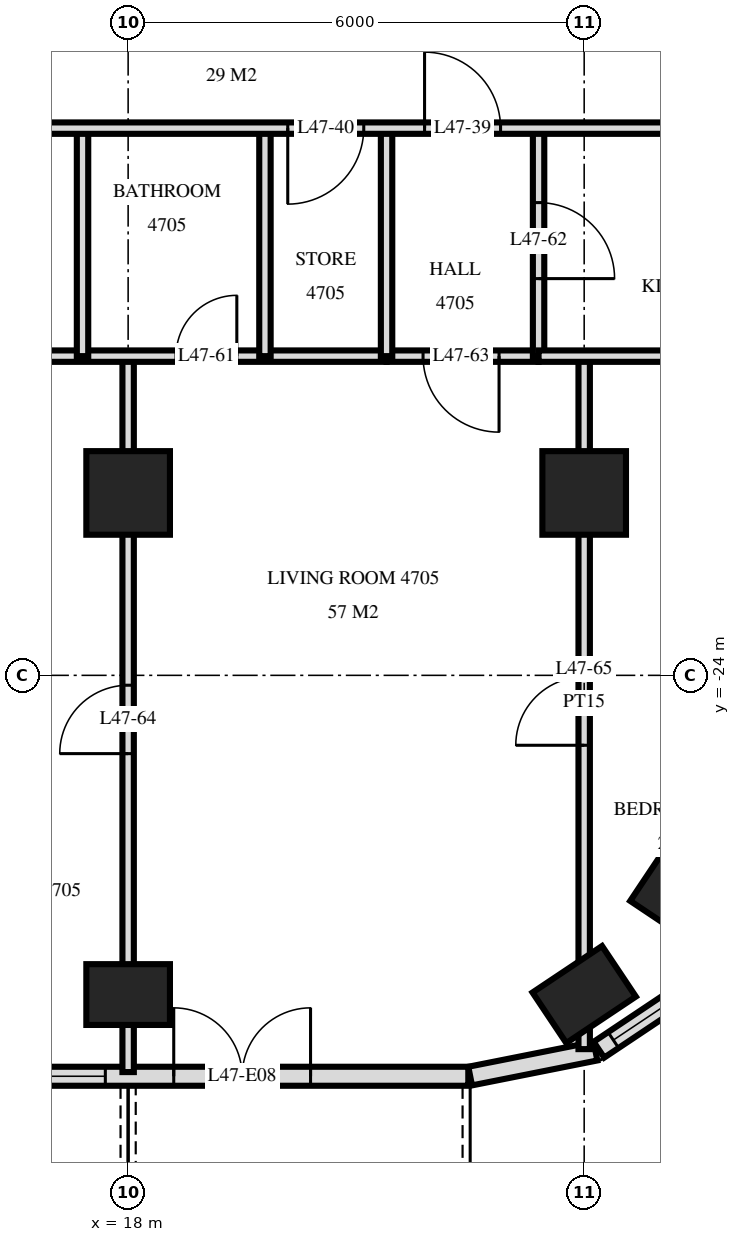
"""IFC4 building model, lengths in metres.
Left out: names, types, materials, properties, quantities, classifications, styles, units other than length and angle.
Written with IfcOpenShell. Run it as: python <this file> out.ifc"""

import sys

from ifc_helpers import new_model, si_unit, direction, frame, frame_2d, origin, origin_2d, place, context, subcontext, project, spatial, rectangle, extrude, element, fill, save


model = new_model("IFC4")
c1 = context("Model", 3, precision=1e-05, world=origin(), true_north=direction((0.0, 1.0)))
c2 = subcontext(c1, "Body", "Model", "MODEL_VIEW")
j1 = project(units=[si_unit("LENGTHUNIT", "METRE"), si_unit("PLANEANGLEUNIT", "RADIAN")], contexts=[c1])
p1 = place(None, origin())
s1 = spatial("IfcSite", under=j1, at=p1, CompositionType="ELEMENT")
p2 = place(p1, origin())
s2 = spatial("IfcBuilding", under=s1, at=p2, CompositionType="ELEMENT")
p3 = place(p2, frame((0.0, 0.0, 183.6)))
s3 = spatial("IfcBuildingStorey", under=s2, at=p3, CompositionType="ELEMENT", Elevation=183.6)
p4 = place(p3, frame((18.0, -28.2, -0.28), z_axis=(0.0, 0.0, 1.0), x_axis=(1.0, 0.0, 0.0)))
e1 = element("IfcColumn", 1, at=p4, inside=s3, PredefinedType="COLUMN", context=c2, shape_type="SweptSolid", body=[
    extrude(rectangle(XDim=1.1, YDim=0.8, at=origin_2d()), origin(), (0.0, 0.0, 1.0), 3.78),
])
p5 = place(p3, frame((18.0, -21.6, -0.28), z_axis=(0.0, 0.0, 1.0), x_axis=(1.0, 0.0, 0.0)))
e2 = element("IfcColumn", 2, at=p5, inside=s3, PredefinedType="COLUMN", context=c2, shape_type="SweptSolid", body=[
    extrude(rectangle(XDim=1.1, YDim=1.1, at=origin_2d()), origin(), (0.0, 0.0, 1.0), 3.78),
])
p6 = place(p3, frame((24.0, -28.2, -0.28), z_axis=(0.0, 0.0, 1.0), x_axis=(0.831459915646, 0.555584744817, 0.0)))
e3 = element("IfcColumn", 3, at=p6, inside=s3, PredefinedType="COLUMN", context=c2, shape_type="SweptSolid", body=[
    extrude(rectangle(XDim=1.1, YDim=0.8, at=origin_2d()), origin(), (0.0, 0.0, 1.0), 3.78),
])
p7 = place(p3, frame((24.0, -21.6, -0.28), z_axis=(0.0, 0.0, 1.0), x_axis=(1.0, 0.0, 0.0)))
e4 = element("IfcColumn", 4, at=p7, inside=s3, PredefinedType="COLUMN", context=c2, shape_type="SweptSolid", body=[
    extrude(rectangle(XDim=1.1, YDim=1.1, at=origin_2d()), origin(), (0.0, 0.0, 1.0), 3.78),
])
p8 = place(p3, frame((25.244, -26.733, -0.28), z_axis=(0.0, 0.0, 1.0), x_axis=(0.555584744817, 0.831459915646, 0.0)))
e5 = element("IfcColumn", 5, at=p8, inside=s3, PredefinedType="COLUMN", context=c2, shape_type="SweptSolid", body=[
    extrude(rectangle(XDim=1.1, YDim=0.8, at=origin_2d()), origin(), (0.0, 0.0, 1.0), 3.78),
])
p9 = place(p3, frame((-22.475, -29.275, 0.0), z_axis=(0.0, 0.0, 1.0), x_axis=(1.0, 0.0, 0.0)))
e6 = element("IfcWall", 6, at=p9, inside=s3, PredefinedType="SOLIDWALL", context=c2, shape_type="SweptSolid", body=[
    extrude(rectangle(XDim=44.951, YDim=0.25, at=frame_2d((22.475, 0.0))), origin(), (0.0, 0.0, 1.0), 3.22),
])
p10 = place(p9, frame((0.575, 0.0, 0.0)))
e7 = element("IfcOpeningElement", 7, at=p10, cuts=e6, PredefinedType="OPENING", context=c2, shape_type="SweptSolid", body=[
    extrude(rectangle(XDim=1.8, YDim=2.4, at=frame_2d((0.9, 1.2))), frame((0.0, 0.135, 0.0), z_axis=(0.0, -1.0, 0.0), x_axis=(1.0, 0.0, 0.0)), (0.0, 0.0, 1.0), 0.27),
])
p11 = place(p9, frame((4.775, 0.0, 0.9)))
e8 = element("IfcOpeningElement", 8, at=p11, cuts=e6, PredefinedType="OPENING", context=c2, shape_type="SweptSolid", body=[
    extrude(rectangle(XDim=2.4, YDim=1.5, at=frame_2d((1.2, 0.75))), frame((0.0, 0.135, 0.0), z_axis=(0.0, -1.0, 0.0), x_axis=(1.0, 0.0, 0.0)), (0.0, 0.0, 1.0), 0.27),
])
p12 = place(p9, frame((8.075, 0.0, 0.0)))
e9 = element("IfcOpeningElement", 9, at=p12, cuts=e6, PredefinedType="OPENING", context=c2, shape_type="SweptSolid", body=[
    extrude(rectangle(XDim=1.8, YDim=2.4, at=frame_2d((0.9, 1.2))), frame((0.0, 0.135, 0.0), z_axis=(0.0, -1.0, 0.0), x_axis=(1.0, 0.0, 0.0)), (0.0, 0.0, 1.0), 0.27),
])
p13 = place(p9, frame((11.075, 0.0, 0.0)))
e10 = element("IfcOpeningElement", 10, at=p13, cuts=e6, PredefinedType="OPENING", context=c2, shape_type="SweptSolid", body=[
    extrude(rectangle(XDim=1.8, YDim=2.4, at=frame_2d((0.9, 1.2))), frame((0.0, 0.135, 0.0), z_axis=(0.0, -1.0, 0.0), x_axis=(1.0, 0.0, 0.0)), (0.0, 0.0, 1.0), 0.27),
])
p14 = place(p9, frame((13.775, 0.0, 0.9)))
e11 = element("IfcOpeningElement", 11, at=p14, cuts=e6, PredefinedType="OPENING", context=c2, shape_type="SweptSolid", body=[
    extrude(rectangle(XDim=2.4, YDim=1.5, at=frame_2d((1.2, 0.75))), frame((0.0, 0.135, 0.0), z_axis=(0.0, -1.0, 0.0), x_axis=(1.0, 0.0, 0.0)), (0.0, 0.0, 1.0), 0.27),
])
p15 = place(p9, frame((20.075, 0.0, 0.0)))
e12 = element("IfcOpeningElement", 12, at=p15, cuts=e6, PredefinedType="OPENING", context=c2, shape_type="SweptSolid", body=[
    extrude(rectangle(XDim=1.8, YDim=2.4, at=frame_2d((0.9, 1.2))), frame((0.0, 0.135, 0.0), z_axis=(0.0, -1.0, 0.0), x_axis=(1.0, 0.0, 0.0)), (0.0, 0.0, 1.0), 0.27),
])
p16 = place(p9, frame((23.075, 0.0, 0.0)))
e13 = element("IfcOpeningElement", 13, at=p16, cuts=e6, PredefinedType="OPENING", context=c2, shape_type="SweptSolid", body=[
    extrude(rectangle(XDim=1.8, YDim=2.4, at=frame_2d((0.9, 1.2))), frame((0.0, 0.135, 0.0), z_axis=(0.0, -1.0, 0.0), x_axis=(1.0, 0.0, 0.0)), (0.0, 0.0, 1.0), 0.27),
])
p17 = place(p9, frame((29.075, 0.0, 0.0)))
e14 = element("IfcOpeningElement", 14, at=p17, cuts=e6, PredefinedType="OPENING", context=c2, shape_type="SweptSolid", body=[
    extrude(rectangle(XDim=1.8, YDim=2.4, at=frame_2d((0.9, 1.2))), frame((0.0, 0.135, 0.0), z_axis=(0.0, -1.0, 0.0), x_axis=(1.0, 0.0, 0.0)), (0.0, 0.0, 1.0), 0.27),
])
p18 = place(p9, frame((31.775, 0.0, 0.9)))
e15 = element("IfcOpeningElement", 15, at=p18, cuts=e6, PredefinedType="OPENING", context=c2, shape_type="SweptSolid", body=[
    extrude(rectangle(XDim=2.4, YDim=1.5, at=frame_2d((1.2, 0.75))), frame((0.0, 0.135, 0.0), z_axis=(0.0, -1.0, 0.0), x_axis=(1.0, 0.0, 0.0)), (0.0, 0.0, 1.0), 0.27),
])
p19 = place(p9, frame((35.075, 0.0, 0.0)))
e16 = element("IfcOpeningElement", 16, at=p19, cuts=e6, PredefinedType="OPENING", context=c2, shape_type="SweptSolid", body=[
    extrude(rectangle(XDim=1.8, YDim=2.4, at=frame_2d((0.9, 1.2))), frame((0.0, 0.135, 0.0), z_axis=(0.0, -1.0, 0.0), x_axis=(1.0, 0.0, 0.0)), (0.0, 0.0, 1.0), 0.27),
])
p20 = place(p9, frame((37.775, 0.0, 0.9)))
e17 = element("IfcOpeningElement", 17, at=p20, cuts=e6, PredefinedType="OPENING", context=c2, shape_type="SweptSolid", body=[
    extrude(rectangle(XDim=2.4, YDim=1.5, at=frame_2d((1.2, 0.75))), frame((0.0, 0.135, 0.0), z_axis=(0.0, -1.0, 0.0), x_axis=(1.0, 0.0, 0.0)), (0.0, 0.0, 1.0), 0.27),
])
p21 = place(p9, frame((41.075, 0.0, 0.0)))
e18 = element("IfcOpeningElement", 18, at=p21, cuts=e6, PredefinedType="OPENING", context=c2, shape_type="SweptSolid", body=[
    extrude(rectangle(XDim=1.8, YDim=2.4, at=frame_2d((0.9, 1.2))), frame((0.0, 0.135, 0.0), z_axis=(0.0, -1.0, 0.0), x_axis=(1.0, 0.0, 0.0)), (0.0, 0.0, 1.0), 0.27),
])
p22 = place(p3, frame((22.5, -29.273, 0.0), z_axis=(0.0, 0.0, 1.0), x_axis=(0.980775640221, 0.19513878023, 0.0)))
e19 = element("IfcWall", 19, at=p22, inside=s3, PredefinedType="SOLIDWALL", context=c2, shape_type="SweptSolid", body=[
    extrude(rectangle(XDim=1.681, YDim=0.25, at=frame_2d((0.841, 0.0))), origin(), (0.0, 0.0, 1.0), 3.22),
])
p23 = place(p3, frame((24.194, -28.926, 0.0), z_axis=(0.0, 0.0, 1.0), x_axis=(0.831482937015, 0.55555029066, 0.0)))
e20 = element("IfcWall", 20, at=p23, inside=s3, PredefinedType="SOLIDWALL", context=c2, shape_type="SweptSolid", body=[
    extrude(rectangle(XDim=1.656, YDim=0.25, at=frame_2d((0.828, 0.0))), origin(), (0.0, 0.0, 1.0), 3.22),
])
p24 = place(p23, frame((0.228, 0.0, 0.9)))
e21 = element("IfcOpeningElement", 21, at=p24, cuts=e20, PredefinedType="OPENING", context=c2, shape_type="SweptSolid", body=[
    extrude(rectangle(XDim=1.2, YDim=1.5, at=frame_2d((0.6, 0.75))), frame((0.0, 0.135, 0.0), z_axis=(0.0, -1.0, 0.0), x_axis=(1.0, 0.0, 0.0)), (0.0, 0.0, 1.0), 0.27),
])
p25 = place(p3, frame((24.0, -28.918, 0.0), z_axis=(0.0, 0.0, 1.0), x_axis=(0.0, 1.0, 0.0)))
e22 = element("IfcWall", 22, at=p25, inside=s3, PredefinedType="PARTITIONING", context=c2, shape_type="SweptSolid", body=[
    extrude(rectangle(XDim=9.118, YDim=0.15, at=frame_2d((4.559, 0.0))), origin(), (0.0, 0.0, 1.0), 3.22),
])
p26 = place(p25, frame((3.998, 0.0, 0.0)))
e23 = element("IfcOpeningElement", 23, at=p26, cuts=e22, PredefinedType="OPENING", context=c2, shape_type="SweptSolid", body=[
    extrude(rectangle(XDim=0.9, YDim=2.1, at=frame_2d((0.45, 1.05))), frame((0.0, 0.085, 0.0), z_axis=(0.0, -1.0, 0.0), x_axis=(1.0, 0.0, 0.0)), (0.0, 0.0, 1.0), 0.17),
])
p27 = place(p3, frame((23.4, -19.8, 0.0), z_axis=(0.0, 0.0, 1.0), x_axis=(0.0, 1.0, 0.0)))
e24 = element("IfcWall", 24, at=p27, inside=s3, PredefinedType="PARTITIONING", context=c2, shape_type="SweptSolid", body=[
    extrude(rectangle(XDim=3.0, YDim=0.15, at=frame_2d((1.5, 0.0))), origin(), (0.0, 0.0, 1.0), 3.22),
])
p28 = place(p27, frame((1.02, 0.0, 0.0)))
e25 = element("IfcOpeningElement", 25, at=p28, cuts=e24, PredefinedType="OPENING", context=c2, shape_type="SweptSolid", body=[
    extrude(rectangle(XDim=1.0, YDim=2.1, at=frame_2d((0.5, 1.05))), frame((0.0, 0.085, 0.0), z_axis=(0.0, -1.0, 0.0), x_axis=(1.0, 0.0, 0.0)), (0.0, 0.0, 1.0), 0.17),
])
for number, where, z_axis, x_axis in (
    (26, (21.4, -19.8, 0.0), (0.0, 0.0, 1.0), (0.0, 1.0, 0.0)),
    (27, (19.8, -19.8, 0.0), (0.0, 0.0, 1.0), (0.0, 1.0, 0.0)),
):
    element("IfcWall", number, at=place(p3, frame(where, z_axis=z_axis, x_axis=x_axis)), inside=s3, PredefinedType="PARTITIONING", context=c2, shape_type="SweptSolid", body=[
        extrude(rectangle(XDim=3.0, YDim=0.15, at=frame_2d((1.5, 0.0))), origin(), (0.0, 0.0, 1.0), 3.22),
    ])
p29 = place(p3, frame((18.0, -29.22, 0.0), z_axis=(0.0, 0.0, 1.0), x_axis=(0.0, 1.0, 0.0)))
e28 = element("IfcWall", 28, at=p29, inside=s3, PredefinedType="PARTITIONING", context=c2, shape_type="SweptSolid", body=[
    extrude(rectangle(XDim=9.42, YDim=0.15, at=frame_2d((4.71, 0.0))), origin(), (0.0, 0.0, 1.0), 3.22),
])
p30 = place(p29, frame((4.19, 0.0, 0.0)))
e29 = element("IfcOpeningElement", 29, at=p30, cuts=e28, PredefinedType="OPENING", context=c2, shape_type="SweptSolid", body=[
    extrude(rectangle(XDim=0.9, YDim=2.1, at=frame_2d((0.45, 1.05))), frame((0.0, 0.085, 0.0), z_axis=(0.0, -1.0, 0.0), x_axis=(1.0, 0.0, 0.0)), (0.0, 0.0, 1.0), 0.17),
])
p31 = place(p3, frame((17.4, -19.8, 0.0), z_axis=(0.0, 0.0, 1.0), x_axis=(0.0, 1.0, 0.0)))
e30 = element("IfcWall", 30, at=p31, inside=s3, PredefinedType="PARTITIONING", context=c2, shape_type="SweptSolid", body=[
    extrude(rectangle(XDim=3.0, YDim=0.15, at=frame_2d((1.5, 0.0))), origin(), (0.0, 0.0, 1.0), 3.22),
])
p32 = place(p3, frame((21.4, -19.8, 0.0), z_axis=(0.0, 0.0, 1.0), x_axis=(1.0, 0.0, 0.0)))
e31 = element("IfcWall", 31, at=p32, inside=s3, PredefinedType="PARTITIONING", context=c2, shape_type="SweptSolid", body=[
    extrude(rectangle(XDim=2.0, YDim=0.15, at=frame_2d((1.0, 0.0))), origin(), (0.0, 0.0, 1.0), 3.22),
])
p33 = place(p32, frame((0.48, 0.0, 0.0)))
e32 = element("IfcOpeningElement", 32, at=p33, cuts=e31, PredefinedType="OPENING", context=c2, shape_type="SweptSolid", body=[
    extrude(rectangle(XDim=1.0, YDim=2.1, at=frame_2d((0.5, 1.05))), frame((0.0, 0.085, 0.0), z_axis=(0.0, -1.0, 0.0), x_axis=(1.0, 0.0, 0.0)), (0.0, 0.0, 1.0), 0.17),
])
p34 = place(p3, frame((13.3, -19.8, 0.0), z_axis=(0.0, 0.0, 1.0), x_axis=(1.0, 0.0, 0.0)))
e33 = element("IfcWall", 33, at=p34, inside=s3, PredefinedType="PARTITIONING", context=c2, shape_type="SweptSolid", body=[
    extrude(rectangle(XDim=8.1, YDim=0.15, at=frame_2d((4.05, 0.0))), origin(), (0.0, 0.0, 1.0), 3.22),
])
p35 = place(p34, frame((2.48, 0.0, 0.0)))
e34 = element("IfcOpeningElement", 34, at=p35, cuts=e33, PredefinedType="OPENING", context=c2, shape_type="SweptSolid", body=[
    extrude(rectangle(XDim=0.8, YDim=2.1, at=frame_2d((0.4, 1.05))), frame((0.0, 0.085, 0.0), z_axis=(0.0, -1.0, 0.0), x_axis=(1.0, 0.0, 0.0)), (0.0, 0.0, 1.0), 0.17),
])
p36 = place(p34, frame((5.33, 0.0, 0.0)))
e35 = element("IfcOpeningElement", 35, at=p36, cuts=e33, PredefinedType="OPENING", context=c2, shape_type="SweptSolid", body=[
    extrude(rectangle(XDim=0.8, YDim=2.1, at=frame_2d((0.4, 1.05))), frame((0.0, 0.085, 0.0), z_axis=(0.0, -1.0, 0.0), x_axis=(1.0, 0.0, 0.0)), (0.0, 0.0, 1.0), 0.17),
])
p37 = place(p3, frame((23.4, -19.8, 0.0), z_axis=(0.0, 0.0, 1.0), x_axis=(1.0, 0.0, 0.0)))
e36 = element("IfcWall", 36, at=p37, inside=s3, PredefinedType="PARTITIONING", context=c2, shape_type="SweptSolid", body=[
    extrude(rectangle(XDim=3.42, YDim=0.15, at=frame_2d((1.71, 0.0))), origin(), (0.0, 0.0, 1.0), 3.22),
])
p38 = place(p3, frame((-26.82, -16.8, 0.0), z_axis=(0.0, 0.0, 1.0), x_axis=(1.0, 0.0, 0.0)))
e37 = element("IfcWall", 37, at=p38, inside=s3, PredefinedType="PARTITIONING", context=c2, shape_type="SweptSolid", body=[
    extrude(rectangle(XDim=53.64, YDim=0.15, at=frame_2d((26.82, 0.0))), origin(), (0.0, 0.0, 1.0), 3.22),
])
p39 = place(p38, frame((11.97, 0.0, 0.0)))
e38 = element("IfcOpeningElement", 38, at=p39, cuts=e37, PredefinedType="OPENING", context=c2, shape_type="SweptSolid", body=[
    extrude(rectangle(XDim=1.0, YDim=2.1, at=frame_2d((0.5, 1.05))), frame((0.0, 0.085, 0.0), z_axis=(0.0, -1.0, 0.0), x_axis=(1.0, 0.0, 0.0)), (0.0, 0.0, 1.0), 0.17),
])
p40 = place(p38, frame((10.67, 0.0, 0.0)))
e39 = element("IfcOpeningElement", 39, at=p40, cuts=e37, PredefinedType="OPENING", context=c2, shape_type="SweptSolid", body=[
    extrude(rectangle(XDim=1.0, YDim=2.1, at=frame_2d((0.5, 1.05))), frame((0.0, 0.085, 0.0), z_axis=(0.0, -1.0, 0.0), x_axis=(1.0, 0.0, 0.0)), (0.0, 0.0, 1.0), 0.17),
])
p41 = place(p38, frame((3.22, 0.0, 0.0)))
e40 = element("IfcOpeningElement", 40, at=p41, cuts=e37, PredefinedType="OPENING", context=c2, shape_type="SweptSolid", body=[
    extrude(rectangle(XDim=1.0, YDim=2.1, at=frame_2d((0.5, 1.05))), frame((0.0, 0.085, 0.0), z_axis=(0.0, -1.0, 0.0), x_axis=(1.0, 0.0, 0.0)), (0.0, 0.0, 1.0), 0.17),
])
p42 = place(p38, frame((5.02, 0.0, 0.0)))
e41 = element("IfcOpeningElement", 41, at=p42, cuts=e37, PredefinedType="OPENING", context=c2, shape_type="SweptSolid", body=[
    extrude(rectangle(XDim=1.0, YDim=2.1, at=frame_2d((0.5, 1.05))), frame((0.0, 0.085, 0.0), z_axis=(0.0, -1.0, 0.0), x_axis=(1.0, 0.0, 0.0)), (0.0, 0.0, 1.0), 0.17),
])
p43 = place(p38, frame((38.97, 0.0, 0.0)))
e42 = element("IfcOpeningElement", 42, at=p43, cuts=e37, PredefinedType="OPENING", context=c2, shape_type="SweptSolid", body=[
    extrude(rectangle(XDim=1.0, YDim=2.1, at=frame_2d((0.5, 1.05))), frame((0.0, 0.085, 0.0), z_axis=(0.0, -1.0, 0.0), x_axis=(1.0, 0.0, 0.0)), (0.0, 0.0, 1.0), 0.17),
])
p44 = place(p38, frame((48.72, 0.0, 0.0)))
e43 = element("IfcOpeningElement", 43, at=p44, cuts=e37, PredefinedType="OPENING", context=c2, shape_type="SweptSolid", body=[
    extrude(rectangle(XDim=1.0, YDim=2.1, at=frame_2d((0.5, 1.05))), frame((0.0, 0.085, 0.0), z_axis=(0.0, -1.0, 0.0), x_axis=(1.0, 0.0, 0.0)), (0.0, 0.0, 1.0), 0.17),
])
p45 = place(p38, frame((46.92, 0.0, 0.0)))
e44 = element("IfcOpeningElement", 44, at=p45, cuts=e37, PredefinedType="OPENING", context=c2, shape_type="SweptSolid", body=[
    extrude(rectangle(XDim=1.0, YDim=2.1, at=frame_2d((0.5, 1.05))), frame((0.0, 0.085, 0.0), z_axis=(0.0, -1.0, 0.0), x_axis=(1.0, 0.0, 0.0)), (0.0, 0.0, 1.0), 0.17),
])
p46 = place(p38, frame((18.32, 0.0, 0.0)))
e45 = element("IfcOpeningElement", 45, at=p46, cuts=e37, PredefinedType="OPENING", context=c2, shape_type="SweptSolid", body=[
    extrude(rectangle(XDim=1.0, YDim=2.1, at=frame_2d((0.5, 1.05))), frame((0.0, 0.085, 0.0), z_axis=(0.0, -1.0, 0.0), x_axis=(1.0, 0.0, 0.0)), (0.0, 0.0, 1.0), 0.17),
])
p47 = place(p38, frame((26.32, 0.0, 0.0)))
e46 = element("IfcOpeningElement", 46, at=p47, cuts=e37, PredefinedType="OPENING", context=c2, shape_type="SweptSolid", body=[
    extrude(rectangle(XDim=1.0, YDim=2.1, at=frame_2d((0.5, 1.05))), frame((0.0, 0.085, 0.0), z_axis=(0.0, -1.0, 0.0), x_axis=(1.0, 0.0, 0.0)), (0.0, 0.0, 1.0), 0.17),
])
p48 = place(p38, frame((34.32, 0.0, 0.0)))
e47 = element("IfcOpeningElement", 47, at=p48, cuts=e37, PredefinedType="OPENING", context=c2, shape_type="SweptSolid", body=[
    extrude(rectangle(XDim=1.0, YDim=2.1, at=frame_2d((0.5, 1.05))), frame((0.0, 0.085, 0.0), z_axis=(0.0, -1.0, 0.0), x_axis=(1.0, 0.0, 0.0)), (0.0, 0.0, 1.0), 0.17),
])
p49 = place(p24, origin())
e48 = element("IfcWindow", 48, at=p49, inside=s3, PartitioningType="SINGLE_PANEL", PredefinedType="WINDOW", context=c2, shape_type="SweptSolid", body=[
    extrude(rectangle(XDim=1.2, YDim=1.5, at=frame_2d((0.6, 0.75))), frame((0.0, 0.03, 0.0), z_axis=(0.0, -1.0, 0.0), x_axis=(1.0, 0.0, 0.0)), (0.0, 0.0, 1.0), 0.06),
])
fill(e21, e48)
p50 = place(p20, origin())
e49 = element("IfcWindow", 49, at=p50, inside=s3, PartitioningType="SINGLE_PANEL", PredefinedType="WINDOW", context=c2, shape_type="SweptSolid", body=[
    extrude(rectangle(XDim=2.4, YDim=1.5, at=frame_2d((1.2, 0.75))), frame((0.0, 0.03, 0.0), z_axis=(0.0, -1.0, 0.0), x_axis=(1.0, 0.0, 0.0)), (0.0, 0.0, 1.0), 0.06),
])
fill(e17, e49)
p51 = place(p21, origin())
e50 = element("IfcDoor", 50, at=p51, inside=s3, OperationType="DOUBLE_DOOR_SINGLE_SWING", PredefinedType="DOOR", context=c2, shape_type="SweptSolid", body=[
    extrude(rectangle(XDim=1.8, YDim=2.4, at=frame_2d((0.9, 1.2))), frame((0.0, 0.025, 0.0), z_axis=(0.0, -1.0, 0.0), x_axis=(1.0, 0.0, 0.0)), (0.0, 0.0, 1.0), 0.05),
])
fill(e18, e50)
p52 = place(p44, origin())
e51 = element("IfcDoor", 51, at=p52, inside=s3, OperationType="SINGLE_SWING_RIGHT", PredefinedType="DOOR", context=c2, shape_type="SweptSolid", body=[
    extrude(rectangle(XDim=1.0, YDim=2.1, at=frame_2d((0.5, 1.05))), frame((0.0, 0.025, 0.0), z_axis=(0.0, -1.0, 0.0), x_axis=(1.0, 0.0, 0.0)), (0.0, 0.0, 1.0), 0.05),
])
fill(e43, e51)
p53 = place(p45, frame((0.5, 0.0, 0.0), z_axis=(0.0, 0.0, 1.0), x_axis=(-1.0, 0.0, 0.0)))
e52 = element("IfcDoor", 52, at=p53, inside=s3, OperationType="SINGLE_SWING_LEFT", PredefinedType="DOOR", context=c2, shape_type="SweptSolid", body=[
    extrude(rectangle(XDim=1.0, YDim=2.1, at=frame_2d((0.0, 1.05))), frame((0.0, -0.025, 0.0), z_axis=(0.0, 1.0, 0.0), x_axis=(-1.0, 0.0, 0.0)), (0.0, 0.0, 1.0), 0.05),
])
fill(e44, e52)
p54 = place(p36, origin())
e53 = element("IfcDoor", 53, at=p54, inside=s3, OperationType="SINGLE_SWING_LEFT", PredefinedType="DOOR", context=c2, shape_type="SweptSolid", body=[
    extrude(rectangle(XDim=0.8, YDim=2.1, at=frame_2d((0.4, 1.05))), frame((0.0, 0.025, 0.0), z_axis=(0.0, -1.0, 0.0), x_axis=(1.0, 0.0, 0.0)), (0.0, 0.0, 1.0), 0.05),
])
fill(e35, e53)
p55 = place(p28, frame((0.5, 0.0, 0.0), z_axis=(0.0, 0.0, 1.0), x_axis=(-1.0, 0.0, 0.0)))
e54 = element("IfcDoor", 54, at=p55, inside=s3, OperationType="SINGLE_SWING_LEFT", PredefinedType="DOOR", context=c2, shape_type="SweptSolid", body=[
    extrude(rectangle(XDim=1.0, YDim=2.1, at=frame_2d((0.0, 1.05))), frame((0.0, -0.025, 0.0), z_axis=(0.0, 1.0, 0.0), x_axis=(-1.0, 0.0, 0.0)), (0.0, 0.0, 1.0), 0.05),
])
fill(e25, e54)
p56 = place(p33, frame((0.5, 0.0, 0.0), z_axis=(0.0, 0.0, 1.0), x_axis=(-1.0, 0.0, 0.0)))
e55 = element("IfcDoor", 55, at=p56, inside=s3, OperationType="SINGLE_SWING_RIGHT", PredefinedType="DOOR", context=c2, shape_type="SweptSolid", body=[
    extrude(rectangle(XDim=1.0, YDim=2.1, at=frame_2d((0.0, 1.05))), frame((0.0, -0.025, 0.0), z_axis=(0.0, 1.0, 0.0), x_axis=(-1.0, 0.0, 0.0)), (0.0, 0.0, 1.0), 0.05),
])
fill(e32, e55)
p57 = place(p30, origin())
e56 = element("IfcDoor", 56, at=p57, inside=s3, OperationType="SINGLE_SWING_RIGHT", PredefinedType="DOOR", context=c2, shape_type="SweptSolid", body=[
    extrude(rectangle(XDim=0.9, YDim=2.1, at=frame_2d((0.45, 1.05))), frame((0.0, 0.025, 0.0), z_axis=(0.0, -1.0, 0.0), x_axis=(1.0, 0.0, 0.0)), (0.0, 0.0, 1.0), 0.05),
])
fill(e29, e56)
p58 = place(p26, origin())
e57 = element("IfcDoor", 57, at=p58, inside=s3, OperationType="SINGLE_SWING_RIGHT", PredefinedType="DOOR", context=c2, shape_type="SweptSolid", body=[
    extrude(rectangle(XDim=0.9, YDim=2.1, at=frame_2d((0.45, 1.05))), frame((0.0, 0.025, 0.0), z_axis=(0.0, -1.0, 0.0), x_axis=(1.0, 0.0, 0.0)), (0.0, 0.0, 1.0), 0.05),
])
fill(e23, e57)
save(model, sys.argv[1])
